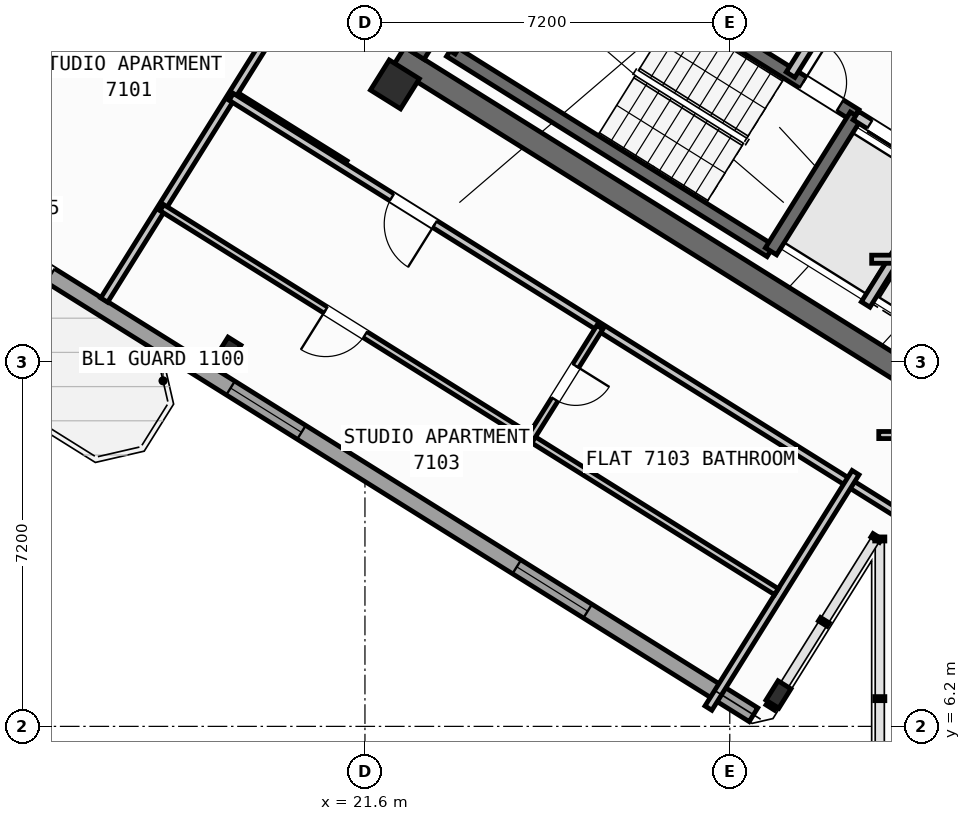
"""IFC4 building model, lengths in metres.
Left out: names, types, materials, properties, quantities, classifications, styles, units other than length and angle.
Written with IfcOpenShell. Run it as: python <this file> out.ifc"""

import sys

from ifc_helpers import new_model, si_unit, direction, frame, frame_2d, origin, origin_2d, place, context, subcontext, project, spatial, rectangle, hollow_rectangle, i_section, extrude, source, transform, mapped, element, fill, save


model = new_model("IFC4")
c1 = context("Model", 3, precision=1e-05, world=origin(), true_north=direction((0.0, 1.0)))
c2 = subcontext(c1, "Body", "Model", "MODEL_VIEW")
j1 = project(units=[si_unit("LENGTHUNIT", "METRE"), si_unit("PLANEANGLEUNIT", "RADIAN")], contexts=[c1])
p1 = place(None, origin())
s1 = spatial("IfcSite", under=j1, at=p1, CompositionType="ELEMENT")
p2 = place(p1, origin())
s2 = spatial("IfcBuilding", under=s1, at=p2, CompositionType="ELEMENT")
p3 = place(p2, frame((0.0, 0.0, 280.8)))
s3 = spatial("IfcBuildingStorey", under=s2, at=p3, CompositionType="ELEMENT", Elevation=280.8)
p4 = place(p3, frame((33.324, 12.503, 0.0), z_axis=(0.0, 0.0, 1.0), x_axis=(-0.848043529849, 0.529926571782, 0.0)))
e1 = element("IfcWall", 1, at=p4, inside=s3, PredefinedType="SHEAR", context=c2, shape_type="SweptSolid", body=[
    extrude(rectangle(XDim=13.04, YDim=0.45, at=frame_2d((6.52, 0.0))), origin(), (0.0, 0.0, 1.0), 3.35),
])
p5 = place(p3, frame((26.007, 24.976, 0.0), z_axis=(0.0, 0.0, 1.0), x_axis=(-0.529931155655, -0.848040665456, 0.0)))
e2 = element("IfcWall", 2, at=p5, inside=s3, PredefinedType="SHEAR", context=c2, shape_type="SweptSolid", body=[
    extrude(rectangle(XDim=6.475, YDim=0.45, at=frame_2d((3.238, 0.0))), origin(), (0.0, 0.0, 1.0), 3.35),
])
m1 = source(origin(), c2, "Body", "SweptSolid", [
    extrude(i_section(OverallWidth=0.3, OverallDepth=0.45, WebThickness=0.014, FlangeThickness=0.026, at=origin_2d()), origin(), (0.0, 0.0, 1.0), 3.6),
])
p6 = place(p3, frame((29.761, 6.829, 0.0), z_axis=(0.0, 0.0, 1.0), x_axis=(-0.848048096156, 0.529919264233, 0.0)))
e3 = element("IfcColumn", 3, at=p6, inside=s3, PredefinedType="COLUMN", context=c2, shape_type="MappedRepresentation", body=[
    mapped(m1, transform((0.0, 0.0, 0.0), scale=1.0)),
])
m2 = source(origin(), c2, "Body", "SweptSolid", [
    extrude(hollow_rectangle(XDim=0.7, YDim=0.7, WallThickness=0.028, at=origin_2d()), origin(), (0.0, 0.0, 1.0), 3.6),
])
p7 = place(p3, frame((22.191, 18.87, 0.0), z_axis=(0.0, 0.0, 1.0), x_axis=(-0.848048096156, 0.529919264233, 0.0)))
e4 = element("IfcColumn", 4, at=p7, inside=s3, PredefinedType="COLUMN", context=c2, shape_type="MappedRepresentation", body=[
    mapped(m2, transform((0.0, 0.0, 0.0), scale=1.0)),
])
p8 = place(p3, frame((18.906, 13.612, 0.0), z_axis=(0.0, 0.0, 1.0), x_axis=(-0.848048096156, 0.529919264233, 0.0)))
e5 = element("IfcColumn", 5, at=p8, inside=s3, PredefinedType="COLUMN", context=c2, shape_type="MappedRepresentation", body=[
    mapped(m1, transform((0.0, 0.0, 0.0), scale=1.0)),
])
p9 = place(p3, frame((29.268, 6.429, 0.0), z_axis=(0.0, 0.0, 1.0), x_axis=(-0.848048398186, 0.529918780885, 0.0)))
e6 = element("IfcWall", 6, at=p9, inside=s3, PredefinedType="STANDARD", context=c2, shape_type="SweptSolid", body=[
    extrude(rectangle(XDim=25.188, YDim=0.32, at=frame_2d((12.594, 0.0))), origin(), (0.0, 0.0, 1.0), 3.35),
])
p10 = place(p9, frame((16.362, 0.0, 0.0)))
e7 = element("IfcOpeningElement", 7, at=p10, cuts=e6, PredefinedType="OPENING", context=c2, shape_type="SweptSolid", body=[
    extrude(rectangle(XDim=1.2, YDim=2.15, at=frame_2d((0.6, 1.075))), frame((0.0, 0.17, 0.0), z_axis=(0.0, -1.0, 0.0), x_axis=(1.0, 0.0, 0.0)), (0.0, 0.0, 1.0), 0.34),
])
p11 = place(p9, frame((3.859, 0.0, 0.9)))
e8 = element("IfcOpeningElement", 8, at=p11, cuts=e6, PredefinedType="OPENING", context=c2, shape_type="SweptSolid", body=[
    extrude(rectangle(XDim=1.65, YDim=1.45, at=frame_2d((0.825, 0.725))), frame((0.0, 0.17, 0.0), z_axis=(0.0, -1.0, 0.0), x_axis=(1.0, 0.0, 0.0)), (0.0, 0.0, 1.0), 0.34),
])
p12 = place(p9, frame((10.519, 0.0, 0.9)))
e9 = element("IfcOpeningElement", 9, at=p12, cuts=e6, PredefinedType="OPENING", context=c2, shape_type="SweptSolid", body=[
    extrude(rectangle(XDim=1.65, YDim=1.45, at=frame_2d((0.825, 0.725))), frame((0.0, 0.17, 0.0), z_axis=(0.0, -1.0, 0.0), x_axis=(1.0, 0.0, 0.0)), (0.0, 0.0, 1.0), 0.34),
])
p13 = place(p9, frame((19.841, 0.0, 0.95)))
e10 = element("IfcOpeningElement", 10, at=p13, cuts=e6, PredefinedType="OPENING", context=c2, shape_type="SweptSolid", body=[
    extrude(rectangle(XDim=1.95, YDim=1.35, at=frame_2d((0.975, 0.675))), frame((0.0, 0.17, 0.0), z_axis=(0.0, -1.0, 0.0), x_axis=(1.0, 0.0, 0.0)), (0.0, 0.0, 1.0), 0.34),
])
p14 = place(p9, frame((23.478, 0.0, 1.0)))
e11 = element("IfcOpeningElement", 11, at=p14, cuts=e6, PredefinedType="OPENING", context=c2, shape_type="SweptSolid", body=[
    extrude(rectangle(XDim=0.9, YDim=1.25, at=frame_2d((0.45, 0.625))), frame((0.0, 0.17, 0.0), z_axis=(0.0, -1.0, 0.0), x_axis=(1.0, 0.0, 0.0)), (0.0, 0.0, 1.0), 0.34),
])
p15 = place(p3, frame((29.605, 15.581, 0.0), z_axis=(0.0, 0.0, 1.0), x_axis=(-0.848036911448, 0.529937163087, 0.0)))
e12 = element("IfcWall", 12, at=p15, inside=s3, PredefinedType="SHEAR", context=c2, shape_type="SweptSolid", body=[
    extrude(rectangle(XDim=7.46, YDim=0.26, at=frame_2d((3.73, 0.0))), origin(), (0.0, 0.0, 1.0), 3.35),
])
p16 = place(p3, frame((31.28, 18.261, 0.0), z_axis=(0.0, 0.0, 1.0), x_axis=(-0.848051618787, 0.529913626805, 0.0)))
e13 = element("IfcWall", 13, at=p16, inside=s3, PredefinedType="SHEAR", context=c2, shape_type="SweptSolid", body=[
    extrude(rectangle(XDim=7.46, YDim=0.26, at=frame_2d((3.73, 0.0))), origin(), (0.0, 0.0, 1.0), 3.35),
])
p17 = place(p16, frame((0.36, 0.0, 0.0)))
e14 = element("IfcOpeningElement", 14, at=p17, cuts=e13, PredefinedType="OPENING", context=c2, shape_type="SweptSolid", body=[
    extrude(rectangle(XDim=0.86, YDim=2.05, at=frame_2d((0.43, 1.025))), frame((0.0, 0.14, 0.0), z_axis=(0.0, -1.0, 0.0), x_axis=(1.0, 0.0, 0.0)), (0.0, 0.0, 1.0), 0.28),
])
p18 = place(p3, frame((31.288, 18.256, 0.0), z_axis=(0.0, 0.0, 1.0), x_axis=(-0.529943379326, -0.848033026897, 0.0)))
e15 = element("IfcWall", 15, at=p18, inside=s3, PredefinedType="SHEAR", context=c2, shape_type="SweptSolid", body=[
    extrude(rectangle(XDim=3.16, YDim=0.26, at=frame_2d((1.58, 0.0))), origin(), (0.0, 0.0, 1.0), 3.35),
])
p19 = place(p3, frame((24.945, 22.22, 0.0), z_axis=(0.0, 0.0, 1.0), x_axis=(-0.529908658664, -0.84805472316, 0.0)))
e16 = element("IfcWall", 16, at=p19, inside=s3, PredefinedType="SHEAR", context=c2, shape_type="SweptSolid", body=[
    extrude(rectangle(XDim=3.16, YDim=0.26, at=frame_2d((1.58, 0.0))), origin(), (0.0, 0.0, 1.0), 3.35),
])
p20 = place(p3, frame((34.933, 15.978, 0.0), z_axis=(0.0, 0.0, 1.0), x_axis=(-0.848055739377, 0.529907032327, 0.0)))
e17 = element("IfcWall", 17, at=p20, inside=s3, PredefinedType="STANDARD", context=c2, shape_type="SweptSolid", body=[
    extrude(rectangle(XDim=4.298, YDim=0.2, at=frame_2d((2.149, 0.0))), origin(), (0.0, 0.0, 1.0), 3.34),
])
p21 = place(p20, frame((0.448, 0.0, 0.0)))
e18 = element("IfcOpeningElement", 18, at=p21, cuts=e17, PredefinedType="OPENING", context=c2, shape_type="SweptSolid", body=[
    extrude(rectangle(XDim=1.3, YDim=2.2, at=frame_2d((0.65, 1.1))), frame((0.0, 0.11, 0.0), z_axis=(0.0, -1.0, 0.0), x_axis=(1.0, 0.0, 0.0)), (0.0, 0.0, 1.0), 0.22),
])
p22 = place(p20, frame((2.523, 0.0, 0.0)))
e19 = element("IfcOpeningElement", 19, at=p22, cuts=e17, PredefinedType="OPENING", context=c2, shape_type="SweptSolid", body=[
    extrude(rectangle(XDim=1.45, YDim=2.25, at=frame_2d((0.725, 1.125))), frame((0.0, 0.11, 0.0), z_axis=(0.0, -1.0, 0.0), x_axis=(1.0, 0.0, 0.0)), (0.0, 0.0, 1.0), 0.22),
])
p23 = place(p3, frame((36.459, 18.421, 0.0), z_axis=(0.0, 0.0, 1.0), x_axis=(-0.848059591691, 0.529900867089, 0.0)))
e20 = element("IfcWall", 20, at=p23, inside=s3, PredefinedType="STANDARD", context=c2, shape_type="SweptSolid", body=[
    extrude(rectangle(XDim=5.818, YDim=0.2, at=frame_2d((2.909, 0.0))), origin(), (0.0, 0.0, 1.0), 3.34),
])
p24 = place(p23, frame((2.598, 0.0, 0.0)))
e21 = element("IfcOpeningElement", 21, at=p24, cuts=e20, PredefinedType="OPENING", context=c2, shape_type="SweptSolid", body=[
    extrude(rectangle(XDim=1.15, YDim=2.1, at=frame_2d((0.575, 1.05))), frame((0.0, 0.11, 0.0), z_axis=(0.0, -1.0, 0.0), x_axis=(1.0, 0.0, 0.0)), (0.0, 0.0, 1.0), 0.22),
])
p25 = place(p3, frame((33.029, 17.003, 0.0), z_axis=(0.0, 0.0, 1.0), x_axis=(-0.529916267533, -0.848049968695, 0.0)))
e22 = element("IfcWall", 22, at=p25, inside=s3, PredefinedType="STANDARD", context=c2, shape_type="SweptSolid", body=[
    extrude(rectangle(XDim=2.92, YDim=0.2, at=frame_2d((1.46, 0.0))), origin(), (0.0, 0.0, 1.0), 3.34),
])
p26 = place(p3, frame((31.525, 21.504, 0.0), z_axis=(0.0, 0.0, 1.0), x_axis=(-0.529907497854, -0.848055448493, 0.0)))
e23 = element("IfcWall", 23, at=p26, inside=s3, PredefinedType="STANDARD", context=c2, shape_type="SweptSolid", body=[
    extrude(rectangle(XDim=2.88, YDim=0.2, at=frame_2d((1.44, 0.0))), origin(), (0.0, 0.0, 1.0), 3.34),
])
p27 = place(p3, frame((21.206, 17.292, 0.0), z_axis=(0.0, 0.0, 1.0), x_axis=(-0.848050851465, 0.529914854792, 0.0)))
e24 = element("IfcWall", 24, at=p27, inside=s3, PredefinedType="PARTITIONING", context=c2, shape_type="SweptSolid", body=[
    extrude(rectangle(XDim=2.61, YDim=0.16, at=frame_2d((1.305, 0.0))), origin(), (0.0, 0.0, 1.0), 3.34),
])
p28 = place(p3, frame((25.807, 29.582, 0.0), z_axis=(0.0, 0.0, 1.0), x_axis=(-0.529918119251, -0.84804881162, 0.0)))
e25 = element("IfcWall", 25, at=p28, inside=s3, PredefinedType="PARTITIONING", context=c2, shape_type="SweptSolid", body=[
    extrude(rectangle(XDim=17.65, YDim=0.16, at=frame_2d((8.825, 0.0))), origin(), (0.0, 0.0, 1.0), 3.34),
])
p29 = place(p3, frame((16.572, 21.954, 0.0), z_axis=(0.0, 0.0, 1.0), x_axis=(-0.529904903214, -0.848057069748, 0.0)))
e26 = element("IfcWall", 26, at=p29, inside=s3, PredefinedType="PARTITIONING", context=c2, shape_type="SweptSolid", body=[
    extrude(rectangle(XDim=5.601, YDim=0.16, at=frame_2d((2.801, 0.0))), origin(), (0.0, 0.0, 1.0), 2.875),
])
p30 = place(p3, frame((19.523, 33.508, 0.0), z_axis=(0.0, 0.0, 1.0), x_axis=(-0.529910765222, -0.848053406869, 0.0)))
e27 = element("IfcWall", 27, at=p30, inside=s3, PredefinedType="PARTITIONING", context=c2, shape_type="SweptSolid", body=[
    extrude(rectangle(XDim=17.92, YDim=0.11, at=frame_2d((8.96, 0.0))), origin(), (0.0, 0.0, 1.0), 3.34),
])
p31 = place(p30, frame((0.76, 0.0, 0.0)))
e28 = element("IfcOpeningElement", 28, at=p31, cuts=e27, PredefinedType="OPENING", context=c2, shape_type="SweptSolid", body=[
    extrude(rectangle(XDim=0.78, YDim=2.05, at=frame_2d((0.39, 1.025))), frame((0.0, 0.065, 0.0), z_axis=(0.0, -1.0, 0.0), x_axis=(1.0, 0.0, 0.0)), (0.0, 0.0, 1.0), 0.13),
])
p32 = place(p30, frame((6.289, 0.0, 0.0)))
e29 = element("IfcOpeningElement", 29, at=p32, cuts=e27, PredefinedType="OPENING", context=c2, shape_type="SweptSolid", body=[
    extrude(rectangle(XDim=0.92, YDim=2.08, at=frame_2d((0.46, 1.04))), frame((0.0, 0.065, 0.0), z_axis=(0.0, -1.0, 0.0), x_axis=(1.0, 0.0, 0.0)), (0.0, 0.0, 1.0), 0.13),
])
p33 = place(p3, frame((32.164, 10.374, 0.0), z_axis=(0.0, 0.0, 1.0), x_axis=(-0.848044107957, 0.529925646633, 0.0)))
e30 = element("IfcWall", 30, at=p33, inside=s3, PredefinedType="PARTITIONING", context=c2, shape_type="SweptSolid", body=[
    extrude(rectangle(XDim=15.57, YDim=0.16, at=frame_2d((7.785, 0.0))), origin(), (0.0, 0.0, 1.0), 3.34),
])
p34 = place(p33, frame((10.83, 0.0, 0.0)))
e31 = element("IfcOpeningElement", 31, at=p34, cuts=e30, PredefinedType="OPENING", context=c2, shape_type="SweptSolid", body=[
    extrude(rectangle(XDim=1.0, YDim=2.1, at=frame_2d((0.5, 1.05))), frame((0.0, 0.09, 0.0), z_axis=(0.0, -1.0, 0.0), x_axis=(1.0, 0.0, 0.0)), (0.0, 0.0, 1.0), 0.18),
])
p35 = place(p3, frame((31.282, 11.208, 0.0), z_axis=(0.0, 0.0, 1.0), x_axis=(-0.529938869374, -0.84803584519, 0.0)))
e32 = element("IfcWall", 32, at=p35, inside=s3, PredefinedType="PARTITIONING", context=c2, shape_type="SweptSolid", body=[
    extrude(rectangle(XDim=5.48, YDim=0.16, at=frame_2d((2.74, 0.0))), origin(), (0.0, 0.0, 1.0), 3.34),
])
p36 = place(p3, frame((29.72, 8.859, 0.0), z_axis=(0.0, 0.0, 1.0), x_axis=(-0.848049134363, 0.529917602752, 0.0)))
e33 = element("IfcWall", 33, at=p36, inside=s3, PredefinedType="PLUMBINGWALL", context=c2, shape_type="SweptSolid", body=[
    extrude(rectangle(XDim=14.3, YDim=0.14, at=frame_2d((7.15, 0.0))), origin(), (0.0, 0.0, 1.0), 3.34),
])
p37 = place(p36, frame((9.57, 0.0, 0.0)))
e34 = element("IfcOpeningElement", 34, at=p37, cuts=e33, PredefinedType="OPENING", context=c2, shape_type="SweptSolid", body=[
    extrude(rectangle(XDim=0.92, YDim=2.08, at=frame_2d((0.46, 1.04))), frame((0.0, 0.08, 0.0), z_axis=(0.0, -1.0, 0.0), x_axis=(1.0, 0.0, 0.0)), (0.0, 0.0, 1.0), 0.16),
])
p38 = place(p3, frame((26.237, 14.078, 0.0), z_axis=(0.0, 0.0, 1.0), x_axis=(-0.52995640672, -0.848024885824, 0.0)))
e35 = element("IfcWall", 35, at=p38, inside=s3, PredefinedType="PLUMBINGWALL", context=c2, shape_type="SweptSolid", body=[
    extrude(rectangle(XDim=2.58, YDim=0.14, at=frame_2d((1.29, 0.0))), origin(), (0.0, 0.0, 1.0), 3.34),
])
p39 = place(p38, frame((0.9, 0.0, 0.0)))
e36 = element("IfcOpeningElement", 36, at=p39, cuts=e35, PredefinedType="OPENING", context=c2, shape_type="SweptSolid", body=[
    extrude(rectangle(XDim=0.78, YDim=2.05, at=frame_2d((0.39, 1.025))), frame((0.0, 0.08, 0.0), z_axis=(0.0, -1.0, 0.0), x_axis=(1.0, 0.0, 0.0)), (0.0, 0.0, 1.0), 0.16),
])
p40 = place(p3, frame((31.6, 15.42, 0.0), z_axis=(0.0, 0.0, 1.0), x_axis=(1.0, 0.0, 0.0)))
e37 = element("IfcWall", 37, at=p40, inside=s3, PredefinedType="PARTITIONING", context=c2, shape_type="SweptSolid", body=[
    extrude(rectangle(XDim=2.984, YDim=0.16, at=frame_2d((1.492, 0.0))), origin(), (0.0, 0.0, 1.0), 3.34),
])
p41 = place(p3, frame((31.74, 11.95, 0.0), z_axis=(0.0, 0.0, 1.0), x_axis=(1.0, 0.0, 0.0)))
e38 = element("IfcWall", 38, at=p41, inside=s3, PredefinedType="PLUMBINGWALL", context=c2, shape_type="SweptSolid", body=[
    extrude(rectangle(XDim=0.842, YDim=0.14, at=frame_2d((0.421, 0.0))), origin(), (0.0, 0.0, 1.0), 3.34),
])
m3 = source(origin(), c2, "Body", "SweptSolid", [
    extrude(rectangle(XDim=1.65, YDim=1.45, at=frame_2d((0.825, 0.725))), frame((0.0, 0.03, 0.0), z_axis=(0.0, -1.0, 0.0), x_axis=(1.0, 0.0, 0.0)), (0.0, 0.0, 1.0), 0.06),
])
p42 = place(p11, origin())
e39 = element("IfcWindow", 39, at=p42, inside=s3, PartitioningType="SINGLE_PANEL", PredefinedType="WINDOW", context=c2, shape_type="MappedRepresentation", body=[
    mapped(m3, transform((0.0, 0.0, 0.0), scale=1.0)),
])
fill(e8, e39)
p43 = place(p12, origin())
e40 = element("IfcWindow", 40, at=p43, inside=s3, PartitioningType="SINGLE_PANEL", PredefinedType="WINDOW", context=c2, shape_type="MappedRepresentation", body=[
    mapped(m3, transform((0.0, 0.0, 0.0), scale=1.0)),
])
fill(e9, e40)
m4 = source(origin(), c2, "Body", "SweptSolid", [
    extrude(rectangle(XDim=0.86, YDim=2.05, at=frame_2d((0.43, 1.025))), frame((0.0, 0.025, 0.0), z_axis=(0.0, -1.0, 0.0), x_axis=(1.0, 0.0, 0.0)), (0.0, 0.0, 1.0), 0.05),
])
p44 = place(p17, frame((0.86, 0.0, 0.0), z_axis=(0.0, 0.0, 1.0), x_axis=(-1.0, 0.0, 0.0)))
e41 = element("IfcDoor", 41, at=p44, inside=s3, OperationType="SINGLE_SWING_LEFT", PredefinedType="DOOR", context=c2, shape_type="MappedRepresentation", body=[
    mapped(m4, transform((0.0, 0.0, 0.0), scale=1.0)),
])
fill(e14, e41)
m5 = source(origin(), c2, "Body", "SweptSolid", [
    extrude(rectangle(XDim=1.45, YDim=2.25, at=frame_2d((0.725, 1.125))), frame((0.0, 0.025, 0.0), z_axis=(0.0, -1.0, 0.0), x_axis=(1.0, 0.0, 0.0)), (0.0, 0.0, 1.0), 0.05),
])
p45 = place(p22, origin())
e42 = element("IfcDoor", 42, at=p45, inside=s3, OperationType="DOUBLE_DOOR_SLIDING", PredefinedType="DOOR", context=c2, shape_type="MappedRepresentation", body=[
    mapped(m5, transform((0.0, 0.0, 0.0), scale=1.0)),
])
fill(e19, e42)
m6 = source(origin(), c2, "Body", "SweptSolid", [
    extrude(rectangle(XDim=1.0, YDim=2.1, at=frame_2d((0.5, 1.05))), frame((0.0, 0.025, 0.0), z_axis=(0.0, -1.0, 0.0), x_axis=(1.0, 0.0, 0.0)), (0.0, 0.0, 1.0), 0.05),
])
p46 = place(p34, origin())
e43 = element("IfcDoor", 43, at=p46, inside=s3, OperationType="SINGLE_SWING_LEFT", PredefinedType="DOOR", context=c2, shape_type="MappedRepresentation", body=[
    mapped(m6, transform((0.0, 0.0, 0.0), scale=1.0)),
])
fill(e31, e43)
m7 = source(origin(), c2, "Body", "SweptSolid", [
    extrude(rectangle(XDim=0.92, YDim=2.08, at=frame_2d((0.46, 1.04))), frame((0.0, 0.025, 0.0), z_axis=(0.0, -1.0, 0.0), x_axis=(1.0, 0.0, 0.0)), (0.0, 0.0, 1.0), 0.05),
])
p47 = place(p37, origin())
e44 = element("IfcDoor", 44, at=p47, inside=s3, OperationType="SINGLE_SWING_RIGHT", PredefinedType="DOOR", context=c2, shape_type="MappedRepresentation", body=[
    mapped(m7, transform((0.0, 0.0, 0.0), scale=1.0)),
])
fill(e34, e44)
m8 = source(origin(), c2, "Body", "SweptSolid", [
    extrude(rectangle(XDim=0.78, YDim=2.05, at=frame_2d((0.39, 1.025))), frame((0.0, 0.025, 0.0), z_axis=(0.0, -1.0, 0.0), x_axis=(1.0, 0.0, 0.0)), (0.0, 0.0, 1.0), 0.05),
])
p48 = place(p39, origin())
e45 = element("IfcDoor", 45, at=p48, inside=s3, OperationType="SINGLE_SWING_LEFT", PredefinedType="DOOR", context=c2, shape_type="MappedRepresentation", body=[
    mapped(m8, transform((0.0, 0.0, 0.0), scale=1.0)),
])
fill(e36, e45)
save(model, sys.argv[1])
